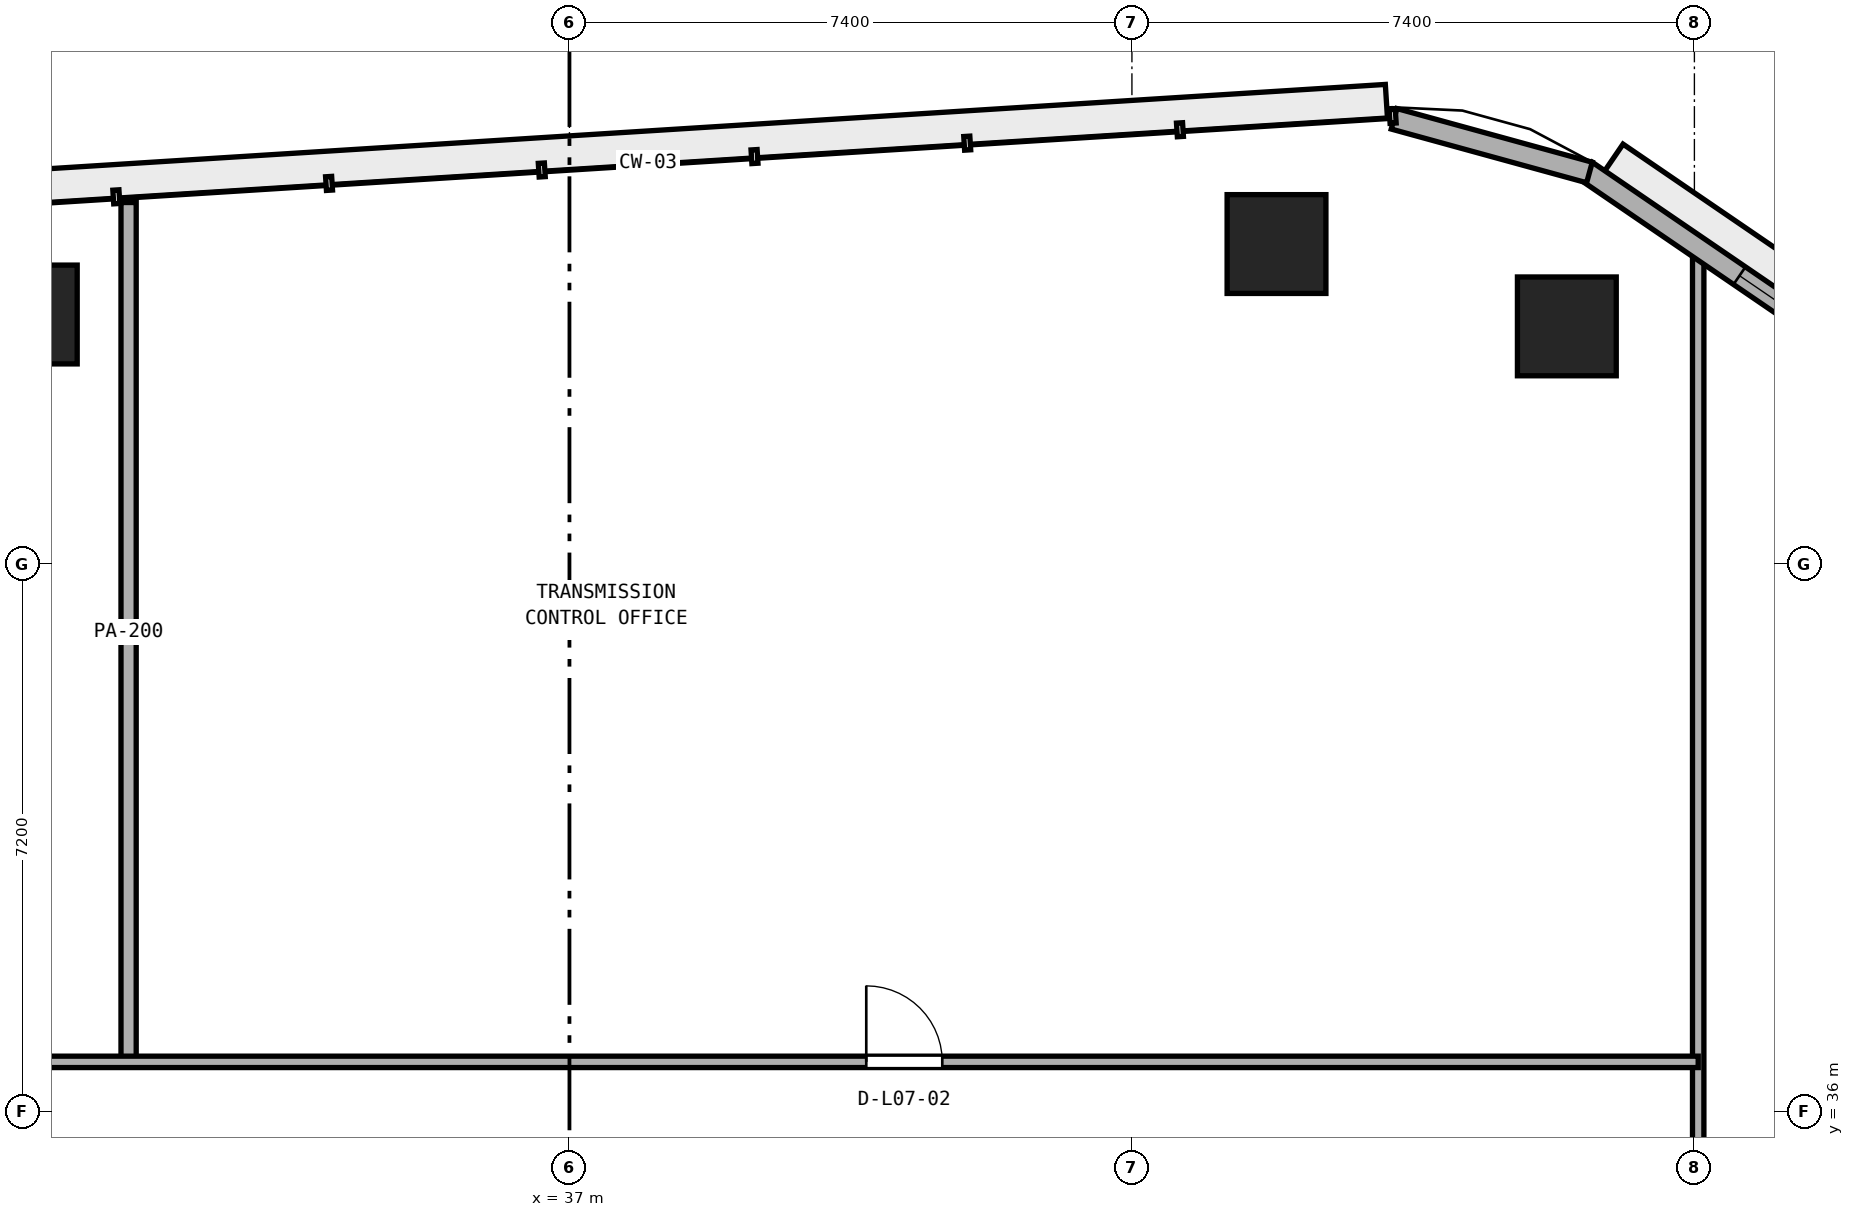
"""IFC4 building model, lengths in metres.
Left out: names, types, materials, properties, quantities, classifications, styles, units other than length and angle.
Written with IfcOpenShell. Run it as: python <this file> out.ifc"""

import sys

from ifc_helpers import new_model, si_unit, direction, frame, frame_2d, origin, origin_2d, place, context, subcontext, project, spatial, rectangle, extrude, element, fill, save


model = new_model("IFC4")
c1 = context("Model", 3, precision=1e-05, world=origin(), true_north=direction((0.0, 1.0)))
c2 = subcontext(c1, "Body", "Model", "MODEL_VIEW")
j1 = project(units=[si_unit("LENGTHUNIT", "METRE"), si_unit("PLANEANGLEUNIT", "RADIAN")], contexts=[c1])
p1 = place(None, origin())
s1 = spatial("IfcSite", under=j1, at=p1, CompositionType="ELEMENT")
p2 = place(p1, origin())
s2 = spatial("IfcBuilding", under=s1, at=p2, CompositionType="ELEMENT")
p3 = place(p2, frame((0.0, 0.0, 32.6)))
s3 = spatial("IfcBuildingStorey", under=s2, at=p3, CompositionType="ELEMENT", Elevation=32.6)
for number, where, z_axis, x_axis in (
    (1, (50.122, 46.326, 0.0), (0.0, 0.0, 1.0), (1.0, 0.0, 0.0)),
    (2, (46.302, 47.409, 0.0), (0.0, 0.0, 1.0), (1.0, 0.0, 0.0)),
    (3, (29.874, 46.482, 0.0), (0.0, 0.0, 1.0), (1.0, 0.0, 0.0)),
):
    element("IfcColumn", number, at=place(p3, frame(where, z_axis=z_axis, x_axis=x_axis)), inside=s3, PredefinedType="COLUMN", context=c2, shape_type="SweptSolid", body=[
        extrude(rectangle(XDim=1.3, YDim=1.3, at=origin_2d()), origin(), (0.0, 0.0, 1.0), 3.8),
    ])
p4 = place(p3, frame((51.85, 13.75, 0.0), z_axis=(0.0, 0.0, 1.0), x_axis=(0.0, 1.0, 0.0)))
e4 = element("IfcWall", 4, at=p4, inside=s3, PredefinedType="PARTITIONING", context=c2, shape_type="SweptSolid", body=[
    extrude(rectangle(XDim=33.644, YDim=0.15, at=frame_2d((16.822, 0.0))), origin(), (0.0, 0.0, 1.0), 3.525),
])
p5 = place(p4, frame((5.425, 0.0, 0.0)))
e5 = element("IfcOpeningElement", 5, at=p5, cuts=e4, PredefinedType="OPENING", context=c2, shape_type="SweptSolid", body=[
    extrude(rectangle(XDim=0.9, YDim=2.1, at=frame_2d((0.45, 1.05))), frame((0.0, 0.085, 0.0), z_axis=(0.0, -1.0, 0.0), x_axis=(1.0, 0.0, 0.0)), (0.0, 0.0, 1.0), 0.17),
])
p6 = place(p4, frame((15.225, 0.0, 0.0)))
e6 = element("IfcOpeningElement", 6, at=p6, cuts=e4, PredefinedType="OPENING", context=c2, shape_type="SweptSolid", body=[
    extrude(rectangle(XDim=0.9, YDim=2.1, at=frame_2d((0.45, 1.05))), frame((0.0, 0.085, 0.0), z_axis=(0.0, -1.0, 0.0), x_axis=(1.0, 0.0, 0.0)), (0.0, 0.0, 1.0), 0.17),
])
p7 = place(p3, frame((31.2, 36.65, 0.0), z_axis=(0.0, 0.0, 1.0), x_axis=(0.0, 1.0, 0.0)))
e7 = element("IfcWall", 7, at=p7, inside=s3, PredefinedType="PARTITIONING", context=c2, shape_type="SweptSolid", body=[
    extrude(rectangle(XDim=11.306, YDim=0.2, at=frame_2d((5.653, 0.0))), origin(), (0.0, 0.0, 1.0), 3.525),
])
p8 = place(p3, frame((22.15, 36.65, 0.0), z_axis=(0.0, 0.0, 1.0), x_axis=(1.0, 0.0, 0.0)))
e8 = element("IfcWall", 8, at=p8, inside=s3, PredefinedType="PARTITIONING", context=c2, shape_type="SweptSolid", body=[
    extrude(rectangle(XDim=29.7, YDim=0.15, at=frame_2d((14.85, 0.0))), origin(), (0.0, 0.0, 1.0), 3.525),
])
p9 = place(p8, frame((4.145, 0.0, 0.0)))
e9 = element("IfcOpeningElement", 9, at=p9, cuts=e8, PredefinedType="OPENING", context=c2, shape_type="SweptSolid", body=[
    extrude(rectangle(XDim=1.0, YDim=2.12, at=frame_2d((0.5, 1.06))), frame((0.0, 0.085, 0.0), z_axis=(0.0, -1.0, 0.0), x_axis=(1.0, 0.0, 0.0)), (0.0, 0.0, 1.0), 0.17),
])
p10 = place(p8, frame((18.755, 0.0, 0.0)))
e10 = element("IfcOpeningElement", 10, at=p10, cuts=e8, PredefinedType="OPENING", context=c2, shape_type="SweptSolid", body=[
    extrude(rectangle(XDim=1.0, YDim=2.12, at=frame_2d((0.5, 1.06))), frame((0.0, 0.085, 0.0), z_axis=(0.0, -1.0, 0.0), x_axis=(1.0, 0.0, 0.0)), (0.0, 0.0, 1.0), 0.17),
])
p11 = place(p3, frame((64.29, 38.867, 0.0), z_axis=(0.0, 0.0, 1.0), x_axis=(-0.825755550159, 0.564028165416, 0.0)))
e11 = element("IfcWall", 11, at=p11, inside=s3, PredefinedType="STANDARD", context=c2, shape_type="SweptSolid", body=[
    extrude(rectangle(XDim=16.848, YDim=0.28, at=frame_2d((8.424, 0.0))), origin(), (0.0, 0.0, 1.0), 3.525),
])
p12 = place(p11, frame((1.941, 0.0, 0.9)))
e12 = element("IfcOpeningElement", 12, at=p12, cuts=e11, PredefinedType="OPENING", context=c2, shape_type="SweptSolid", body=[
    extrude(rectangle(XDim=2.4, YDim=1.75, at=frame_2d((1.2, 0.875))), frame((0.0, 0.15, 0.0), z_axis=(0.0, -1.0, 0.0), x_axis=(1.0, 0.0, 0.0)), (0.0, 0.0, 1.0), 0.3),
])
p13 = place(p11, frame((7.224, 0.0, 0.9)))
e13 = element("IfcOpeningElement", 13, at=p13, cuts=e11, PredefinedType="OPENING", context=c2, shape_type="SweptSolid", body=[
    extrude(rectangle(XDim=2.4, YDim=1.75, at=frame_2d((1.2, 0.875))), frame((0.0, 0.15, 0.0), z_axis=(0.0, -1.0, 0.0), x_axis=(1.0, 0.0, 0.0)), (0.0, 0.0, 1.0), 0.3),
])
p14 = place(p11, frame((12.007, 0.0, 0.9)))
e14 = element("IfcOpeningElement", 14, at=p14, cuts=e11, PredefinedType="OPENING", context=c2, shape_type="SweptSolid", body=[
    extrude(rectangle(XDim=2.4, YDim=1.75, at=frame_2d((1.2, 0.875))), frame((0.0, 0.15, 0.0), z_axis=(0.0, -1.0, 0.0), x_axis=(1.0, 0.0, 0.0)), (0.0, 0.0, 1.0), 0.3),
])
p15 = place(p3, frame((50.419, 48.351, 0.0), z_axis=(0.0, 0.0, 1.0), x_axis=(-0.964263320055, 0.264945748402, 0.0)))
e15 = element("IfcWall", 15, at=p15, inside=s3, PredefinedType="STANDARD", context=c2, shape_type="SweptSolid", body=[
    extrude(rectangle(XDim=2.666, YDim=0.28, at=frame_2d((1.333, 0.0))), origin(), (0.0, 0.0, 1.0), 3.525),
])
p16 = place(p10, origin())
e16 = element("IfcDoor", 16, at=p16, inside=s3, OperationType="SINGLE_SWING_LEFT", PredefinedType="DOOR", context=c2, shape_type="SweptSolid", body=[
    extrude(rectangle(XDim=1.0, YDim=2.12, at=frame_2d((0.5, 1.06))), frame((0.0, 0.025, 0.0), z_axis=(0.0, -1.0, 0.0), x_axis=(1.0, 0.0, 0.0)), (0.0, 0.0, 1.0), 0.05),
])
fill(e10, e16)
p17 = place(p14, origin())
e17 = element("IfcWindow", 17, at=p17, inside=s3, PartitioningType="SINGLE_PANEL", PredefinedType="WINDOW", context=c2, shape_type="SweptSolid", body=[
    extrude(rectangle(XDim=2.4, YDim=1.75, at=frame_2d((1.2, 0.875))), frame((0.0, 0.03, 0.0), z_axis=(0.0, -1.0, 0.0), x_axis=(1.0, 0.0, 0.0)), (0.0, 0.0, 1.0), 0.06),
])
fill(e14, e17)
save(model, sys.argv[1])
